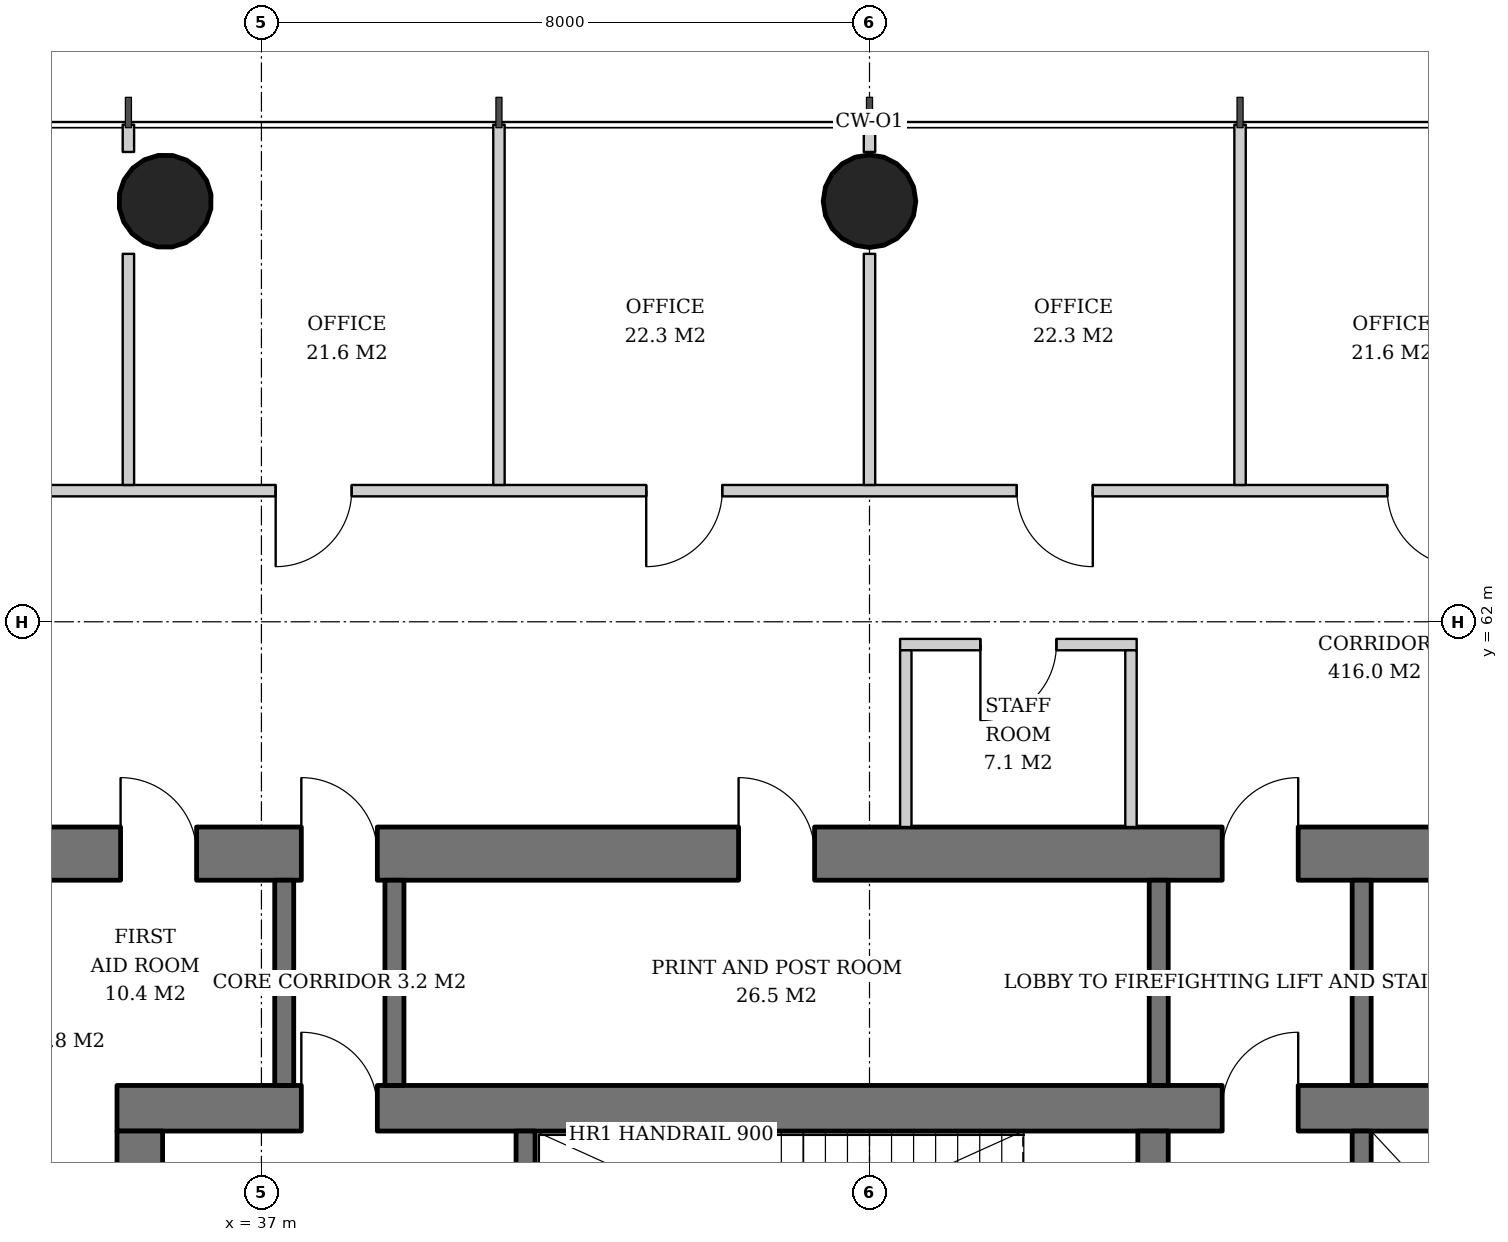
"""IFC4 building model, lengths in metres.
Left out: names, types, materials, properties, quantities, classifications, styles, units other than length and angle.
Written with IfcOpenShell. Run it as: python <this file> out.ifc"""

import sys

from ifc_helpers import new_model, si_unit, direction, frame, frame_2d, origin, origin_2d, place, context, subcontext, project, spatial, rectangle, hollow_circle, extrude, element, fill, save


model = new_model("IFC4")
c1 = context("Model", 3, precision=1e-05, world=origin(), true_north=direction((0.0, 1.0)))
c2 = subcontext(c1, "Body", "Model", "MODEL_VIEW")
j1 = project(units=[si_unit("LENGTHUNIT", "METRE"), si_unit("PLANEANGLEUNIT", "RADIAN")], contexts=[c1])
p1 = place(None, origin())
s1 = spatial("IfcSite", under=j1, at=p1, CompositionType="ELEMENT")
p2 = place(p1, origin())
s2 = spatial("IfcBuilding", under=s1, at=p2, CompositionType="ELEMENT")
p3 = place(p2, frame((0.0, 0.0, 97.0)))
s3 = spatial("IfcBuildingStorey", under=s2, at=p3, CompositionType="ELEMENT", Elevation=97.0)
p4 = place(p3, frame((45.0, 67.572, 0.0), z_axis=(0.0, -0.031978496719, 0.999488557087), x_axis=(1.0, 0.0, 0.0)))
e1 = element("IfcColumn", 1, at=p4, inside=s3, PredefinedType="COLUMN", context=c2, shape_type="SweptSolid", body=[
    extrude(hollow_circle(Radius=0.61, WallThickness=0.04, at=origin_2d()), origin(), (0.0, 0.0, 1.0), 3.802),
])
p5 = place(p3, frame((35.714, 67.572, 0.0), z_axis=(0.015923015547, -0.031974442509, 0.999361842679), x_axis=(0.895145027055, 0.445775033553, 0.0)))
e2 = element("IfcColumn", 2, at=p5, inside=s3, PredefinedType="COLUMN", context=c2, shape_type="SweptSolid", body=[
    extrude(hollow_circle(Radius=0.61, WallThickness=0.04, at=origin_2d()), origin(), (0.0, 0.0, 1.0), 3.802),
])
p6 = place(p3, frame((35.1, 55.6, 0.0), z_axis=(0.0, 0.0, 1.0), x_axis=(1.0, 0.0, 0.0)))
e3 = element("IfcWall", 3, at=p6, inside=s3, PredefinedType="SHEAR", context=c2, shape_type="SweptSolid", body=[
    extrude(rectangle(XDim=19.8, YDim=0.6, at=frame_2d((9.9, 0.0))), origin(), (0.0, 0.0, 1.0), 3.8),
])
p7 = place(p6, frame((14.54, 0.0, 0.0)))
e4 = element("IfcOpeningElement", 4, at=p7, cuts=e3, PredefinedType="OPENING", context=c2, shape_type="SweptSolid", body=[
    extrude(rectangle(XDim=1.0, YDim=2.1, at=frame_2d((0.5, 1.05))), frame((0.0, 0.31, 0.0), z_axis=(0.0, -1.0, 0.0), x_axis=(1.0, 0.0, 0.0)), (0.0, 0.0, 1.0), 0.62),
])
p8 = place(p6, frame((2.425, 0.0, 0.0)))
e5 = element("IfcOpeningElement", 5, at=p8, cuts=e3, PredefinedType="OPENING", context=c2, shape_type="SweptSolid", body=[
    extrude(rectangle(XDim=1.0, YDim=2.1, at=frame_2d((0.5, 1.05))), frame((0.0, 0.31, 0.0), z_axis=(0.0, -1.0, 0.0), x_axis=(1.0, 0.0, 0.0)), (0.0, 0.0, 1.0), 0.62),
])
p9 = place(p3, frame((35.4, 36.7, 0.0), z_axis=(0.0, 0.0, 1.0), x_axis=(0.0, 1.0, 0.0)))
e6 = element("IfcWall", 6, at=p9, inside=s3, PredefinedType="SHEAR", context=c2, shape_type="SweptSolid", body=[
    extrude(rectangle(XDim=18.6, YDim=0.6, at=frame_2d((9.3, 0.0))), origin(), (0.0, 0.0, 1.0), 3.8),
])
p10 = place(p9, frame((8.4, 0.0, 0.0)))
e7 = element("IfcOpeningElement", 7, at=p10, cuts=e6, PredefinedType="OPENING", context=c2, shape_type="SweptSolid", body=[
    extrude(rectangle(XDim=1.8, YDim=2.4, at=frame_2d((0.9, 1.2))), frame((0.0, 0.31, 0.0), z_axis=(0.0, -1.0, 0.0), x_axis=(1.0, 0.0, 0.0)), (0.0, 0.0, 1.0), 0.62),
])
p11 = place(p3, frame((31.7, 58.95, 0.0), z_axis=(0.0, 0.0, 1.0), x_axis=(1.0, 0.0, 0.0)))
e8 = element("IfcWall", 8, at=p11, inside=s3, PredefinedType="SHEAR", context=c2, shape_type="SweptSolid", body=[
    extrude(rectangle(XDim=26.6, YDim=0.7, at=frame_2d((13.3, 0.0))), origin(), (0.0, 0.0, 1.0), 3.8),
])
p12 = place(p11, frame((17.94, 0.0, 0.0)))
e9 = element("IfcOpeningElement", 9, at=p12, cuts=e8, PredefinedType="OPENING", context=c2, shape_type="SweptSolid", body=[
    extrude(rectangle(XDim=1.0, YDim=2.1, at=frame_2d((0.5, 1.05))), frame((0.0, 0.36, 0.0), z_axis=(0.0, -1.0, 0.0), x_axis=(1.0, 0.0, 0.0)), (0.0, 0.0, 1.0), 0.72),
])
p13 = place(p11, frame((5.825, 0.0, 0.0)))
e10 = element("IfcOpeningElement", 10, at=p13, cuts=e8, PredefinedType="OPENING", context=c2, shape_type="SweptSolid", body=[
    extrude(rectangle(XDim=1.0, YDim=2.1, at=frame_2d((0.5, 1.05))), frame((0.0, 0.36, 0.0), z_axis=(0.0, -1.0, 0.0), x_axis=(1.0, 0.0, 0.0)), (0.0, 0.0, 1.0), 0.72),
])
p14 = place(p11, frame((1.169, 0.0, 0.0)))
e11 = element("IfcOpeningElement", 11, at=p14, cuts=e8, PredefinedType="OPENING", context=c2, shape_type="SweptSolid", body=[
    extrude(rectangle(XDim=1.0, YDim=2.1, at=frame_2d((0.5, 1.05))), frame((0.0, 0.36, 0.0), z_axis=(0.0, -1.0, 0.0), x_axis=(1.0, 0.0, 0.0)), (0.0, 0.0, 1.0), 0.72),
])
p15 = place(p11, frame((3.447, 0.0, 0.0)))
e12 = element("IfcOpeningElement", 12, at=p15, cuts=e8, PredefinedType="OPENING", context=c2, shape_type="SweptSolid", body=[
    extrude(rectangle(XDim=1.0, YDim=2.1, at=frame_2d((0.5, 1.05))), frame((0.0, 0.36, 0.0), z_axis=(0.0, -1.0, 0.0), x_axis=(1.0, 0.0, 0.0)), (0.0, 0.0, 1.0), 0.72),
])
p16 = place(p11, frame((11.577, 0.0, 0.0)))
e13 = element("IfcOpeningElement", 13, at=p16, cuts=e8, PredefinedType="OPENING", context=c2, shape_type="SweptSolid", body=[
    extrude(rectangle(XDim=1.0, YDim=2.1, at=frame_2d((0.5, 1.05))), frame((0.0, 0.36, 0.0), z_axis=(0.0, -1.0, 0.0), x_axis=(1.0, 0.0, 0.0)), (0.0, 0.0, 1.0), 0.72),
])
p17 = place(p11, frame((20.9, 0.0, 0.0)))
e14 = element("IfcOpeningElement", 14, at=p17, cuts=e8, PredefinedType="OPENING", context=c2, shape_type="SweptSolid", body=[
    extrude(rectangle(XDim=1.0, YDim=2.1, at=frame_2d((0.5, 1.05))), frame((0.0, 0.36, 0.0), z_axis=(0.0, -1.0, 0.0), x_axis=(1.0, 0.0, 0.0)), (0.0, 0.0, 1.0), 0.72),
])
p18 = place(p11, frame((23.75, 0.0, 0.0)))
e15 = element("IfcOpeningElement", 15, at=p18, cuts=e8, PredefinedType="OPENING", context=c2, shape_type="SweptSolid", body=[
    extrude(rectangle(XDim=1.0, YDim=2.1, at=frame_2d((0.5, 1.05))), frame((0.0, 0.36, 0.0), z_axis=(0.0, -1.0, 0.0), x_axis=(1.0, 0.0, 0.0)), (0.0, 0.0, 1.0), 0.72),
])
p19 = place(p3, frame((48.73, 52.4, 0.0), z_axis=(0.0, 0.0, 1.0), x_axis=(0.0, 1.0, 0.0)))
e16 = element("IfcWall", 16, at=p19, inside=s3, PredefinedType="SHEAR", context=c2, shape_type="SweptSolid", body=[
    extrude(rectangle(XDim=2.9, YDim=0.4, at=frame_2d((1.45, 0.0))), origin(), (0.0, 0.0, 1.0), 3.8),
])
p20 = place(p19, frame((0.3, 0.0, 0.0)))
e17 = element("IfcOpeningElement", 17, at=p20, cuts=e16, PredefinedType="OPENING", context=c2, shape_type="SweptSolid", body=[
    extrude(rectangle(XDim=1.0, YDim=2.1, at=frame_2d((0.5, 1.05))), frame((0.0, 0.21, 0.0), z_axis=(0.0, -1.0, 0.0), x_axis=(1.0, 0.0, 0.0)), (0.0, 0.0, 1.0), 0.42),
])
p21 = place(p3, frame((40.475, 52.4, 0.0), z_axis=(0.0, 0.0, 1.0), x_axis=(0.0, 1.0, 0.0)))
e18 = element("IfcWall", 18, at=p21, inside=s3, PredefinedType="SHEAR", context=c2, shape_type="SweptSolid", body=[
    extrude(rectangle(XDim=2.9, YDim=0.25, at=frame_2d((1.45, 0.0))), origin(), (0.0, 0.0, 1.0), 3.8),
])
p22 = place(p3, frame((51.475, 52.4, 0.0), z_axis=(0.0, 0.0, 1.0), x_axis=(0.0, 1.0, 0.0)))
e19 = element("IfcWall", 19, at=p22, inside=s3, PredefinedType="SHEAR", context=c2, shape_type="SweptSolid", body=[
    extrude(rectangle(XDim=2.9, YDim=0.25, at=frame_2d((1.45, 0.0))), origin(), (0.0, 0.0, 1.0), 3.8),
])
p23 = place(p22, frame((0.8, 0.0, 0.0)))
e20 = element("IfcOpeningElement", 20, at=p23, cuts=e19, PredefinedType="OPENING", context=c2, shape_type="SweptSolid", body=[
    extrude(rectangle(XDim=1.3, YDim=2.2, at=frame_2d((0.65, 1.1))), frame((0.0, 0.135, 0.0), z_axis=(0.0, -1.0, 0.0), x_axis=(1.0, 0.0, 0.0)), (0.0, 0.0, 1.0), 0.27),
])
for number, where, z_axis, x_axis in (
    (21, (48.805, 55.9, 0.0), (0.0, 0.0, 1.0), (0.0, 1.0, 0.0)),
    (22, (51.475, 55.9, 0.0), (0.0, 0.0, 1.0), (0.0, 1.0, 0.0)),
    (23, (37.3, 55.9, 0.0), (0.0, 0.0, 1.0), (0.0, 1.0, 0.0)),
    (24, (38.75, 55.9, 0.0), (0.0, 0.0, 1.0), (0.0, 1.0, 0.0)),
):
    element("IfcWall", number, at=place(p3, frame(where, z_axis=z_axis, x_axis=x_axis)), inside=s3, PredefinedType="SOLIDWALL", context=c2, shape_type="SweptSolid", body=[
        extrude(rectangle(XDim=2.7, YDim=0.25, at=frame_2d((1.35, 0.0))), origin(), (0.0, 0.0, 1.0), 3.62),
    ])
p24 = place(p3, frame((48.515, 61.7, 0.0), z_axis=(0.0, 0.0, 1.0), x_axis=(-1.0, 0.0, 0.0)))
e25 = element("IfcWall", 25, at=p24, inside=s3, PredefinedType="PARTITIONING", context=c2, shape_type="SweptSolid", body=[
    extrude(rectangle(XDim=3.112, YDim=0.15, at=frame_2d((1.556, 0.0))), origin(), (0.0, 0.0, 1.0), 3.62),
])
p25 = place(p24, frame((1.056, 0.0, 0.0)))
e26 = element("IfcOpeningElement", 26, at=p25, cuts=e25, PredefinedType="OPENING", context=c2, shape_type="SweptSolid", body=[
    extrude(rectangle(XDim=1.0, YDim=2.1, at=frame_2d((0.5, 1.05))), frame((0.0, 0.085, 0.0), z_axis=(0.0, -1.0, 0.0), x_axis=(1.0, 0.0, 0.0)), (0.0, 0.0, 1.0), 0.17),
])
for number, where, z_axis, x_axis in (
    (27, (48.44, 59.3, 0.0), (0.0, 0.0, 1.0), (0.0, 1.0, 0.0)),
    (28, (45.478, 59.3, 0.0), (0.0, 0.0, 1.0), (0.0, 1.0, 0.0)),
):
    element("IfcWall", number, at=place(p3, frame(where, z_axis=z_axis, x_axis=x_axis)), inside=s3, PredefinedType="PARTITIONING", context=c2, shape_type="SweptSolid", body=[
        extrude(rectangle(XDim=2.325, YDim=0.15, at=frame_2d((1.163, 0.0))), origin(), (0.0, 0.0, 1.0), 3.62),
    ])
p26 = place(p3, frame((60.812, 63.725, 0.0), z_axis=(0.0, 0.0, 1.0), x_axis=(-1.0, 0.0, 0.0)))
e29 = element("IfcWall", 29, at=p26, inside=s3, PredefinedType="PARTITIONING", context=c2, shape_type="SweptSolid", body=[
    extrude(rectangle(XDim=31.623, YDim=0.15, at=frame_2d((15.812, 0.0))), origin(), (0.0, 0.0, 1.0), 2.72),
])
p27 = place(p26, frame((3.124, 0.0, 0.0)))
e30 = element("IfcOpeningElement", 30, at=p27, cuts=e29, PredefinedType="OPENING", context=c2, shape_type="SweptSolid", body=[
    extrude(rectangle(XDim=1.0, YDim=2.1, at=frame_2d((0.5, 1.05))), frame((0.0, 0.085, 0.0), z_axis=(0.0, -1.0, 0.0), x_axis=(1.0, 0.0, 0.0)), (0.0, 0.0, 1.0), 0.17),
])
p28 = place(p26, frame((7.999, 0.0, 0.0)))
e31 = element("IfcOpeningElement", 31, at=p28, cuts=e29, PredefinedType="OPENING", context=c2, shape_type="SweptSolid", body=[
    extrude(rectangle(XDim=1.0, YDim=2.1, at=frame_2d((0.5, 1.05))), frame((0.0, 0.085, 0.0), z_axis=(0.0, -1.0, 0.0), x_axis=(1.0, 0.0, 0.0)), (0.0, 0.0, 1.0), 0.17),
])
p29 = place(p26, frame((12.874, 0.0, 0.0)))
e32 = element("IfcOpeningElement", 32, at=p29, cuts=e29, PredefinedType="OPENING", context=c2, shape_type="SweptSolid", body=[
    extrude(rectangle(XDim=1.0, YDim=2.1, at=frame_2d((0.5, 1.05))), frame((0.0, 0.085, 0.0), z_axis=(0.0, -1.0, 0.0), x_axis=(1.0, 0.0, 0.0)), (0.0, 0.0, 1.0), 0.17),
])
p30 = place(p26, frame((17.749, 0.0, 0.0)))
e33 = element("IfcOpeningElement", 33, at=p30, cuts=e29, PredefinedType="OPENING", context=c2, shape_type="SweptSolid", body=[
    extrude(rectangle(XDim=1.0, YDim=2.1, at=frame_2d((0.5, 1.05))), frame((0.0, 0.085, 0.0), z_axis=(0.0, -1.0, 0.0), x_axis=(1.0, 0.0, 0.0)), (0.0, 0.0, 1.0), 0.17),
])
p31 = place(p26, frame((22.624, 0.0, 0.0)))
e34 = element("IfcOpeningElement", 34, at=p31, cuts=e29, PredefinedType="OPENING", context=c2, shape_type="SweptSolid", body=[
    extrude(rectangle(XDim=1.0, YDim=2.1, at=frame_2d((0.5, 1.05))), frame((0.0, 0.085, 0.0), z_axis=(0.0, -1.0, 0.0), x_axis=(1.0, 0.0, 0.0)), (0.0, 0.0, 1.0), 0.17),
])
p32 = place(p26, frame((27.499, 0.0, 0.0)))
e35 = element("IfcOpeningElement", 35, at=p32, cuts=e29, PredefinedType="OPENING", context=c2, shape_type="SweptSolid", body=[
    extrude(rectangle(XDim=1.0, YDim=2.1, at=frame_2d((0.5, 1.05))), frame((0.0, 0.085, 0.0), z_axis=(0.0, -1.0, 0.0), x_axis=(1.0, 0.0, 0.0)), (0.0, 0.0, 1.0), 0.17),
])
p33 = place(p3, frame((49.875, 63.8, 0.0), z_axis=(0.0, 0.0, 1.0), x_axis=(0.0, 1.0, 0.0)))
e36 = element("IfcWall", 36, at=p33, inside=s3, PredefinedType="PARTITIONING", context=c2, shape_type="SweptSolid", body=[
    extrude(rectangle(XDim=4.74, YDim=0.15, at=frame_2d((2.37, 0.0))), origin(), (0.0, 0.0, 1.0), 2.82),
])
p34 = place(p3, frame((45.0, 63.8, 0.0), z_axis=(0.0, 0.0, 1.0), x_axis=(0.0, 1.0, 0.0)))
e37 = element("IfcWall", 37, at=p34, inside=s3, PredefinedType="PARTITIONING", context=c2, shape_type="SweptSolid", body=[
    extrude(rectangle(XDim=3.041, YDim=0.15, at=frame_2d((1.52, 0.0))), origin(), (0.0, 0.0, 1.0), 2.858),
])
p35 = place(p3, frame((45.0, 68.181, 0.0), z_axis=(0.0, 0.0, 1.0), x_axis=(0.0, 1.0, 0.0)))
e38 = element("IfcWall", 38, at=p35, inside=s3, PredefinedType="PARTITIONING", context=c2, shape_type="SweptSolid", body=[
    extrude(rectangle(XDim=0.359, YDim=0.15, at=frame_2d((0.18, 0.0))), origin(), (0.0, 0.0, 1.0), 3.62),
])
p36 = place(p3, frame((40.125, 63.8, 0.0), z_axis=(0.0, 0.0, 1.0), x_axis=(0.0, 1.0, 0.0)))
e39 = element("IfcWall", 39, at=p36, inside=s3, PredefinedType="PARTITIONING", context=c2, shape_type="SweptSolid", body=[
    extrude(rectangle(XDim=4.74, YDim=0.15, at=frame_2d((2.37, 0.0))), origin(), (0.0, 0.0, 1.0), 2.82),
])
p37 = place(p3, frame((35.25, 63.8, 0.0), z_axis=(0.0, 0.0, 1.0), x_axis=(0.0, 1.0, 0.0)))
e40 = element("IfcWall", 40, at=p37, inside=s3, PredefinedType="PARTITIONING", context=c2, shape_type="SweptSolid", body=[
    extrude(rectangle(XDim=3.041, YDim=0.15, at=frame_2d((1.52, 0.0))), origin(), (0.0, 0.0, 1.0), 3.62),
])
p38 = place(p3, frame((35.25, 68.181, 0.0), z_axis=(0.0, 0.0, 1.0), x_axis=(0.0, 1.0, 0.0)))
e41 = element("IfcWall", 41, at=p38, inside=s3, PredefinedType="PARTITIONING", context=c2, shape_type="SweptSolid", body=[
    extrude(rectangle(XDim=0.359, YDim=0.15, at=frame_2d((0.18, 0.0))), origin(), (0.0, 0.0, 1.0), 3.62),
])
p39 = place(p7, origin())
e42 = element("IfcDoor", 42, at=p39, inside=s3, OperationType="SINGLE_SWING_RIGHT", PredefinedType="DOOR", context=c2, shape_type="SweptSolid", body=[
    extrude(rectangle(XDim=1.0, YDim=2.1, at=frame_2d((0.5, 1.05))), frame((0.0, 0.025, 0.0), z_axis=(0.0, -1.0, 0.0), x_axis=(1.0, 0.0, 0.0)), (0.0, 0.0, 1.0), 0.05),
])
fill(e4, e42)
p40 = place(p12, origin())
e43 = element("IfcDoor", 43, at=p40, inside=s3, OperationType="SINGLE_SWING_RIGHT", PredefinedType="DOOR", context=c2, shape_type="SweptSolid", body=[
    extrude(rectangle(XDim=1.0, YDim=2.1, at=frame_2d((0.5, 1.05))), frame((0.0, 0.025, 0.0), z_axis=(0.0, -1.0, 0.0), x_axis=(1.0, 0.0, 0.0)), (0.0, 0.0, 1.0), 0.05),
])
fill(e9, e43)
p41 = place(p13, origin())
e44 = element("IfcDoor", 44, at=p41, inside=s3, OperationType="SINGLE_SWING_LEFT", PredefinedType="DOOR", context=c2, shape_type="SweptSolid", body=[
    extrude(rectangle(XDim=1.0, YDim=2.1, at=frame_2d((0.5, 1.05))), frame((0.0, 0.025, 0.0), z_axis=(0.0, -1.0, 0.0), x_axis=(1.0, 0.0, 0.0)), (0.0, 0.0, 1.0), 0.05),
])
fill(e10, e44)
p42 = place(p8, origin())
e45 = element("IfcDoor", 45, at=p42, inside=s3, OperationType="SINGLE_SWING_LEFT", PredefinedType="DOOR", context=c2, shape_type="SweptSolid", body=[
    extrude(rectangle(XDim=1.0, YDim=2.1, at=frame_2d((0.5, 1.05))), frame((0.0, -0.24, 0.0), z_axis=(0.0, -1.0, 0.0), x_axis=(1.0, 0.0, 0.0)), (0.0, 0.0, 1.0), 0.05),
])
fill(e5, e45)
p43 = place(p15, origin())
e46 = element("IfcDoor", 46, at=p43, inside=s3, OperationType="SINGLE_SWING_LEFT", PredefinedType="DOOR", context=c2, shape_type="SweptSolid", body=[
    extrude(rectangle(XDim=1.0, YDim=2.1, at=frame_2d((0.5, 1.05))), frame((0.0, -0.29, 0.0), z_axis=(0.0, -1.0, 0.0), x_axis=(1.0, 0.0, 0.0)), (0.0, 0.0, 1.0), 0.05),
])
fill(e12, e46)
p44 = place(p16, origin())
e47 = element("IfcDoor", 47, at=p44, inside=s3, OperationType="SINGLE_SWING_LEFT", PredefinedType="DOOR", context=c2, shape_type="SweptSolid", body=[
    extrude(rectangle(XDim=1.0, YDim=2.1, at=frame_2d((0.5, 1.05))), frame((0.0, -0.29, 0.0), z_axis=(0.0, -1.0, 0.0), x_axis=(1.0, 0.0, 0.0)), (0.0, 0.0, 1.0), 0.05),
])
fill(e13, e47)
p45 = place(p25, origin())
e48 = element("IfcDoor", 48, at=p45, inside=s3, OperationType="SINGLE_SWING_RIGHT", PredefinedType="DOOR", context=c2, shape_type="SweptSolid", body=[
    extrude(rectangle(XDim=1.0, YDim=2.1, at=frame_2d((0.5, 1.05))), frame((0.0, 0.025, 0.0), z_axis=(0.0, -1.0, 0.0), x_axis=(1.0, 0.0, 0.0)), (0.0, 0.0, 1.0), 0.05),
])
fill(e26, e48)
p46 = place(p28, origin())
e49 = element("IfcDoor", 49, at=p46, inside=s3, OperationType="SINGLE_SWING_LEFT", PredefinedType="DOOR", context=c2, shape_type="SweptSolid", body=[
    extrude(rectangle(XDim=1.0, YDim=2.1, at=frame_2d((0.5, 1.05))), frame((0.0, 0.025, 0.0), z_axis=(0.0, -1.0, 0.0), x_axis=(1.0, 0.0, 0.0)), (0.0, 0.0, 1.0), 0.05),
])
fill(e31, e49)
p47 = place(p29, origin())
e50 = element("IfcDoor", 50, at=p47, inside=s3, OperationType="SINGLE_SWING_LEFT", PredefinedType="DOOR", context=c2, shape_type="SweptSolid", body=[
    extrude(rectangle(XDim=1.0, YDim=2.1, at=frame_2d((0.5, 1.05))), frame((0.0, 0.025, 0.0), z_axis=(0.0, -1.0, 0.0), x_axis=(1.0, 0.0, 0.0)), (0.0, 0.0, 1.0), 0.05),
])
fill(e32, e50)
p48 = place(p30, origin())
e51 = element("IfcDoor", 51, at=p48, inside=s3, OperationType="SINGLE_SWING_RIGHT", PredefinedType="DOOR", context=c2, shape_type="SweptSolid", body=[
    extrude(rectangle(XDim=1.0, YDim=2.1, at=frame_2d((0.5, 1.05))), frame((0.0, 0.025, 0.0), z_axis=(0.0, -1.0, 0.0), x_axis=(1.0, 0.0, 0.0)), (0.0, 0.0, 1.0), 0.05),
])
fill(e33, e51)
p49 = place(p31, origin())
e52 = element("IfcDoor", 52, at=p49, inside=s3, OperationType="SINGLE_SWING_RIGHT", PredefinedType="DOOR", context=c2, shape_type="SweptSolid", body=[
    extrude(rectangle(XDim=1.0, YDim=2.1, at=frame_2d((0.5, 1.05))), frame((0.0, 0.025, 0.0), z_axis=(0.0, -1.0, 0.0), x_axis=(1.0, 0.0, 0.0)), (0.0, 0.0, 1.0), 0.05),
])
fill(e34, e52)
save(model, sys.argv[1])
